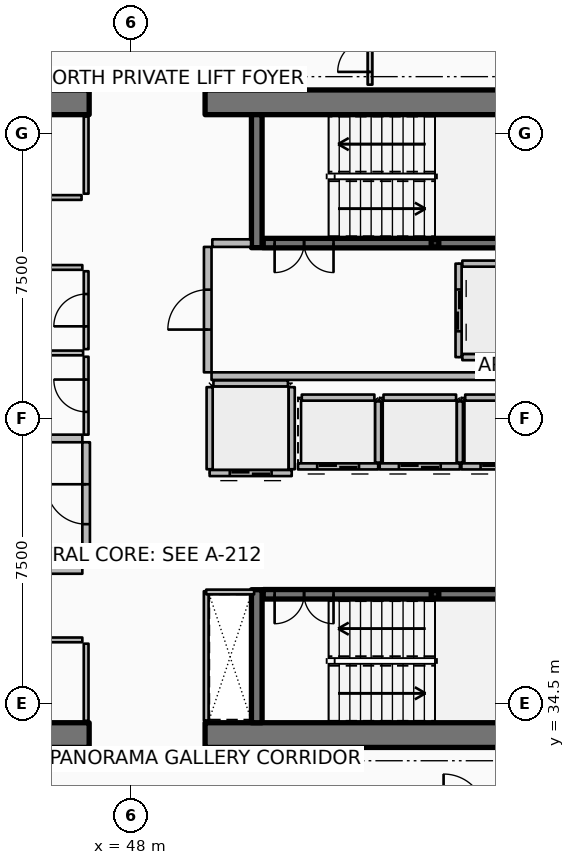
"""IFC4 building model, lengths in metres.
Left out: names, types, materials, properties, quantities, classifications, styles, units other than length and angle.
Written with IfcOpenShell. Run it as: python <this file> out.ifc"""

import sys

from ifc_helpers import new_model, si_unit, direction, frame, frame_2d, origin, origin_2d, place, context, subcontext, project, spatial, rectangle, hollow_rectangle, extrude, element, fill, save


model = new_model("IFC4")
c1 = context("Model", 3, precision=1e-05, world=origin(), true_north=direction((0.0, 1.0)))
c2 = subcontext(c1, "Body", "Model", "MODEL_VIEW")
j1 = project(units=[si_unit("LENGTHUNIT", "METRE"), si_unit("PLANEANGLEUNIT", "RADIAN")], contexts=[c1])
p1 = place(None, origin())
s1 = spatial("IfcSite", under=j1, at=p1, CompositionType="ELEMENT")
p2 = place(p1, origin())
s2 = spatial("IfcBuilding", under=s1, at=p2, CompositionType="ELEMENT")
p3 = place(p2, frame((0.0, 0.0, 259.8)))
s3 = spatial("IfcBuildingStorey", under=s2, at=p3, CompositionType="ELEMENT", Elevation=259.8)
for number, where, z_axis, x_axis in (
    (1, (37.15, 33.675, 0.0), (0.0, 0.0, 1.0), (1.0, 0.0, 0.0)),
    (2, (49.95, 33.675, 0.0), (0.0, 0.0, 1.0), (1.0, 0.0, 0.0)),
    (3, (37.15, 50.325, 0.0), (0.0, 0.0, 1.0), (1.0, 0.0, 0.0)),
    (4, (49.95, 50.325, 0.0), (0.0, 0.0, 1.0), (1.0, 0.0, 0.0)),
):
    element("IfcWall", number, at=place(p3, frame(where, z_axis=z_axis, x_axis=x_axis)), inside=s3, PredefinedType="SHEAR", context=c2, shape_type="SweptSolid", body=[
        extrude(rectangle(XDim=9.75, YDim=0.65, at=frame_2d((4.875, 0.0))), origin(), (0.0, 0.0, 1.0), 3.85),
    ])
for number, where, z_axis, x_axis in (
    (5, (51.31, 46.5, 0.0), (0.0, 0.0, 1.0), (0.0, 1.0, 0.0)),
    (6, (51.31, 34.0, 0.0), (0.0, 0.0, 1.0), (0.0, 1.0, 0.0)),
):
    element("IfcWall", number, at=place(p3, frame(where, z_axis=z_axis, x_axis=x_axis)), inside=s3, PredefinedType="SHEAR", context=c2, shape_type="SweptSolid", body=[
        extrude(rectangle(XDim=3.5, YDim=0.28, at=frame_2d((1.75, 0.0))), origin(), (0.0, 0.0, 1.0), 3.85),
    ])
for number, where, z_axis, x_axis in (
    (7, (56.0, 46.62, 0.0), (0.0, 0.0, 1.0), (1.0, 0.0, 0.0)),
    (8, (56.0, 37.38, 0.0), (0.0, 0.0, 1.0), (1.0, 0.0, 0.0)),
):
    element("IfcColumn", number, at=place(p3, frame(where, z_axis=z_axis, x_axis=x_axis)), inside=s3, PredefinedType="COLUMN", context=c2, shape_type="SweptSolid", body=[
        extrude(hollow_rectangle(XDim=0.2, YDim=0.2, WallThickness=0.01, InnerFilletRadius=0.01, OuterFilletRadius=0.02, at=origin_2d()), origin(), (0.0, 0.0, 1.0), 1.72),
    ])
p4 = place(p3, frame((51.48, 46.62, 0.0), z_axis=(0.0, 0.0, 1.0), x_axis=(1.0, 0.0, 0.0)))
e9 = element("IfcWall", 9, at=p4, inside=s3, PredefinedType="SOLIDWALL", context=c2, shape_type="SweptSolid", body=[
    extrude(rectangle(XDim=7.54, YDim=0.25, at=frame_2d((3.77, 0.0))), origin(), (0.0, 0.0, 1.0), 3.59),
])
p5 = place(p4, frame((0.3, 0.0, 0.0)))
e10 = element("IfcOpeningElement", 10, at=p5, cuts=e9, PredefinedType="OPENING", context=c2, shape_type="SweptSolid", body=[
    extrude(rectangle(XDim=1.55, YDim=2.15, at=frame_2d((0.775, 1.075))), frame((0.0, 0.135, 0.0), z_axis=(0.0, -1.0, 0.0), x_axis=(1.0, 0.0, 0.0)), (0.0, 0.0, 1.0), 0.27),
])
p6 = place(p3, frame((51.48, 37.38, 0.0), z_axis=(0.0, 0.0, 1.0), x_axis=(1.0, 0.0, 0.0)))
e11 = element("IfcWall", 11, at=p6, inside=s3, PredefinedType="SOLIDWALL", context=c2, shape_type="SweptSolid", body=[
    extrude(rectangle(XDim=7.54, YDim=0.25, at=frame_2d((3.77, 0.0))), origin(), (0.0, 0.0, 1.0), 3.59),
])
p7 = place(p6, frame((0.3, 0.0, 0.0)))
e12 = element("IfcOpeningElement", 12, at=p7, cuts=e11, PredefinedType="OPENING", context=c2, shape_type="SweptSolid", body=[
    extrude(rectangle(XDim=1.55, YDim=2.15, at=frame_2d((0.775, 1.075))), frame((0.0, 0.135, 0.0), z_axis=(0.0, -1.0, 0.0), x_axis=(1.0, 0.0, 0.0)), (0.0, 0.0, 1.0), 0.27),
])
p8 = place(p3, frame((54.505, 40.745, 0.0), z_axis=(0.0, 0.0, 1.0), x_axis=(-1.0, 0.0, 0.0)))
e13 = element("IfcWall", 13, at=p8, inside=s3, PredefinedType="PARTITIONING", context=c2, shape_type="SweptSolid", body=[
    extrude(rectangle(XDim=2.11, YDim=0.16, at=frame_2d((1.055, 0.0))), origin(), (0.0, 0.0, 1.0), 3.59),
])
p9 = place(p8, frame((0.505, 0.0, 0.0)))
e14 = element("IfcOpeningElement", 14, at=p9, cuts=e13, PredefinedType="OPENING", context=c2, shape_type="SweptSolid", body=[
    extrude(rectangle(XDim=1.1, YDim=2.1, at=frame_2d((0.55, 1.05))), frame((0.0, 0.09, 0.0), z_axis=(0.0, -1.0, 0.0), x_axis=(1.0, 0.0, 0.0)), (0.0, 0.0, 1.0), 0.18),
])
p10 = place(p3, frame((54.505, 40.845, 0.0), z_axis=(0.0, 0.0, 1.0), x_axis=(0.0, 1.0, 0.0)))
e15 = element("IfcWall", 15, at=p10, inside=s3, PredefinedType="PARTITIONING", context=c2, shape_type="SweptSolid", body=[
    extrude(rectangle(XDim=1.61, YDim=0.16, at=frame_2d((0.805, 0.0))), origin(), (0.0, 0.0, 1.0), 3.59),
])
p11 = place(p3, frame((52.495, 42.555, 0.0), z_axis=(0.0, 0.0, 1.0), x_axis=(1.0, 0.0, 0.0)))
e16 = element("IfcWall", 16, at=p11, inside=s3, PredefinedType="PARTITIONING", context=c2, shape_type="SweptSolid", body=[
    extrude(rectangle(XDim=1.91, YDim=0.16, at=frame_2d((0.955, 0.0))), origin(), (0.0, 0.0, 1.0), 3.59),
])
p12 = place(p3, frame((56.655, 40.745, 0.0), z_axis=(0.0, 0.0, 1.0), x_axis=(-1.0, 0.0, 0.0)))
e17 = element("IfcWall", 17, at=p12, inside=s3, PredefinedType="PARTITIONING", context=c2, shape_type="SweptSolid", body=[
    extrude(rectangle(XDim=2.11, YDim=0.16, at=frame_2d((1.055, 0.0))), origin(), (0.0, 0.0, 1.0), 3.59),
])
p13 = place(p12, frame((0.505, 0.0, 0.0)))
e18 = element("IfcOpeningElement", 18, at=p13, cuts=e17, PredefinedType="OPENING", context=c2, shape_type="SweptSolid", body=[
    extrude(rectangle(XDim=1.1, YDim=2.1, at=frame_2d((0.55, 1.05))), frame((0.0, 0.09, 0.0), z_axis=(0.0, -1.0, 0.0), x_axis=(1.0, 0.0, 0.0)), (0.0, 0.0, 1.0), 0.18),
])
p14 = place(p3, frame((56.655, 40.845, 0.0), z_axis=(0.0, 0.0, 1.0), x_axis=(0.0, 1.0, 0.0)))
e19 = element("IfcWall", 19, at=p14, inside=s3, PredefinedType="PARTITIONING", context=c2, shape_type="SweptSolid", body=[
    extrude(rectangle(XDim=1.61, YDim=0.16, at=frame_2d((0.805, 0.0))), origin(), (0.0, 0.0, 1.0), 3.59),
])
p15 = place(p3, frame((54.645, 42.555, 0.0), z_axis=(0.0, 0.0, 1.0), x_axis=(1.0, 0.0, 0.0)))
e20 = element("IfcWall", 20, at=p15, inside=s3, PredefinedType="PARTITIONING", context=c2, shape_type="SweptSolid", body=[
    extrude(rectangle(XDim=1.91, YDim=0.16, at=frame_2d((0.955, 0.0))), origin(), (0.0, 0.0, 1.0), 3.59),
])
p16 = place(p3, frame((58.805, 40.745, 0.0), z_axis=(0.0, 0.0, 1.0), x_axis=(-1.0, 0.0, 0.0)))
e21 = element("IfcWall", 21, at=p16, inside=s3, PredefinedType="PARTITIONING", context=c2, shape_type="SweptSolid", body=[
    extrude(rectangle(XDim=2.11, YDim=0.16, at=frame_2d((1.055, 0.0))), origin(), (0.0, 0.0, 1.0), 3.59),
])
p17 = place(p16, frame((0.505, 0.0, 0.0)))
e22 = element("IfcOpeningElement", 22, at=p17, cuts=e21, PredefinedType="OPENING", context=c2, shape_type="SweptSolid", body=[
    extrude(rectangle(XDim=1.1, YDim=2.1, at=frame_2d((0.55, 1.05))), frame((0.0, 0.09, 0.0), z_axis=(0.0, -1.0, 0.0), x_axis=(1.0, 0.0, 0.0)), (0.0, 0.0, 1.0), 0.18),
])
p18 = place(p3, frame((56.795, 42.555, 0.0), z_axis=(0.0, 0.0, 1.0), x_axis=(1.0, 0.0, 0.0)))
e23 = element("IfcWall", 23, at=p18, inside=s3, PredefinedType="PARTITIONING", context=c2, shape_type="SweptSolid", body=[
    extrude(rectangle(XDim=1.91, YDim=0.16, at=frame_2d((0.955, 0.0))), origin(), (0.0, 0.0, 1.0), 3.59),
])
p19 = place(p3, frame((56.62, 46.08, 0.0), z_axis=(0.0, 0.0, 1.0), x_axis=(0.0, -1.0, 0.0)))
e24 = element("IfcWall", 24, at=p19, inside=s3, PredefinedType="PARTITIONING", context=c2, shape_type="SweptSolid", body=[
    extrude(rectangle(XDim=2.46, YDim=0.16, at=frame_2d((1.23, 0.0))), origin(), (0.0, 0.0, 1.0), 3.59),
])
p20 = place(p19, frame((0.68, 0.0, 0.0)))
e25 = element("IfcOpeningElement", 25, at=p20, cuts=e24, PredefinedType="OPENING", context=c2, shape_type="SweptSolid", body=[
    extrude(rectangle(XDim=1.1, YDim=2.1, at=frame_2d((0.55, 1.05))), frame((0.0, 0.09, 0.0), z_axis=(0.0, -1.0, 0.0), x_axis=(1.0, 0.0, 0.0)), (0.0, 0.0, 1.0), 0.18),
])
for number, where, z_axis, x_axis in (
    (26, (56.72, 46.08, 0.0), (0.0, 0.0, 1.0), (1.0, 0.0, 0.0)),
    (27, (56.72, 43.62, 0.0), (0.0, 0.0, 1.0), (1.0, 0.0, 0.0)),
):
    element("IfcWall", number, at=place(p3, frame(where, z_axis=z_axis, x_axis=x_axis)), inside=s3, PredefinedType="PARTITIONING", context=c2, shape_type="SweptSolid", body=[
        extrude(rectangle(XDim=2.06, YDim=0.16, at=frame_2d((1.03, 0.0))), origin(), (0.0, 0.0, 1.0), 3.59),
    ])
p21 = place(p3, frame((52.23, 40.57, 0.0), z_axis=(0.0, 0.0, 1.0), x_axis=(-1.0, 0.0, 0.0)))
e28 = element("IfcWall", 28, at=p21, inside=s3, PredefinedType="PARTITIONING", context=c2, shape_type="SweptSolid", body=[
    extrude(rectangle(XDim=2.16, YDim=0.16, at=frame_2d((1.08, 0.0))), origin(), (0.0, 0.0, 1.0), 3.59),
])
p22 = place(p21, frame((0.53, 0.0, 0.0)))
e29 = element("IfcOpeningElement", 29, at=p22, cuts=e28, PredefinedType="OPENING", context=c2, shape_type="SweptSolid", body=[
    extrude(rectangle(XDim=1.1, YDim=2.1, at=frame_2d((0.55, 1.05))), frame((0.0, 0.09, 0.0), z_axis=(0.0, -1.0, 0.0), x_axis=(1.0, 0.0, 0.0)), (0.0, 0.0, 1.0), 0.18),
])
for number, where, z_axis, x_axis in (
    (30, (52.23, 40.67, 0.0), (0.0, 0.0, 1.0), (0.0, 1.0, 0.0)),
    (31, (50.07, 40.67, 0.0), (0.0, 0.0, 1.0), (0.0, 1.0, 0.0)),
):
    element("IfcWall", number, at=place(p3, frame(where, z_axis=z_axis, x_axis=x_axis)), inside=s3, PredefinedType="PARTITIONING", context=c2, shape_type="SweptSolid", body=[
        extrude(rectangle(XDim=2.16, YDim=0.16, at=frame_2d((1.08, 0.0))), origin(), (0.0, 0.0, 1.0), 3.59),
    ])
p23 = place(p3, frame((50.17, 42.93, 0.0), z_axis=(0.0, 0.0, 1.0), x_axis=(1.0, 0.0, 0.0)))
e32 = element("IfcWall", 32, at=p23, inside=s3, PredefinedType="PARTITIONING", context=c2, shape_type="SweptSolid", body=[
    extrude(rectangle(XDim=1.96, YDim=0.16, at=frame_2d((0.98, 0.0))), origin(), (0.0, 0.0, 1.0), 3.59),
])
p24 = place(p3, frame((46.82, 34.05, 0.0), z_axis=(0.0, 0.0, 1.0), x_axis=(0.0, 1.0, 0.0)))
e33 = element("IfcWall", 33, at=p24, inside=s3, PredefinedType="PARTITIONING", context=c2, shape_type="SweptSolid", body=[
    extrude(rectangle(XDim=2.03, YDim=0.125, at=frame_2d((1.015, 0.0))), origin(), (0.0, 0.0, 1.0), 3.03),
])
p25 = place(p3, frame((42.6, 36.18, 0.0), z_axis=(0.0, 0.0, 1.0), x_axis=(1.0, 0.0, 0.0)))
e34 = element("IfcWall", 34, at=p25, inside=s3, PredefinedType="PARTITIONING", context=c2, shape_type="SweptSolid", body=[
    extrude(rectangle(XDim=4.12, YDim=0.125, at=frame_2d((2.06, 0.0))), origin(), (0.0, 0.0, 1.0), 3.03),
])
p26 = place(p25, frame((1.635, 0.0, 0.0)))
e35 = element("IfcOpeningElement", 35, at=p26, cuts=e34, PredefinedType="OPENING", context=c2, shape_type="SweptSolid", body=[
    extrude(rectangle(XDim=0.85, YDim=2.06, at=frame_2d((0.425, 1.03))), frame((0.0, 0.073, 0.0), z_axis=(0.0, -1.0, 0.0), x_axis=(1.0, 0.0, 0.0)), (0.0, 0.0, 1.0), 0.145),
])
p27 = place(p3, frame((46.82, 47.92, 0.0), z_axis=(0.0, 0.0, 1.0), x_axis=(0.0, 1.0, 0.0)))
e36 = element("IfcWall", 36, at=p27, inside=s3, PredefinedType="PARTITIONING", context=c2, shape_type="SweptSolid", body=[
    extrude(rectangle(XDim=2.03, YDim=0.125, at=frame_2d((1.015, 0.0))), origin(), (0.0, 0.0, 1.0), 3.03),
])
p28 = place(p3, frame((37.92, 47.82, 0.0), z_axis=(0.0, 0.0, 1.0), x_axis=(1.0, 0.0, 0.0)))
e37 = element("IfcWall", 37, at=p28, inside=s3, PredefinedType="PARTITIONING", context=c2, shape_type="SweptSolid", body=[
    extrude(rectangle(XDim=8.78, YDim=0.125, at=frame_2d((4.39, 0.0))), origin(), (0.0, 0.0, 1.0), 3.03),
])
p29 = place(p28, frame((3.965, 0.0, 0.0)))
e38 = element("IfcOpeningElement", 38, at=p29, cuts=e37, PredefinedType="OPENING", context=c2, shape_type="SweptSolid", body=[
    extrude(rectangle(XDim=0.85, YDim=2.06, at=frame_2d((0.425, 1.03))), frame((0.0, 0.073, 0.0), z_axis=(0.0, -1.0, 0.0), x_axis=(1.0, 0.0, 0.0)), (0.0, 0.0, 1.0), 0.145),
])
p30 = place(p3, frame((41.35, 38.02, 0.0), z_axis=(0.0, 0.0, 1.0), x_axis=(1.0, 0.0, 0.0)))
e39 = element("IfcWall", 39, at=p30, inside=s3, PredefinedType="PARTITIONING", context=c2, shape_type="SweptSolid", body=[
    extrude(rectangle(XDim=5.37, YDim=0.2, at=frame_2d((2.685, 0.0))), origin(), (0.0, 0.0, 1.0), 3.59),
])
p31 = place(p3, frame((43.92, 41.48, 0.0), z_axis=(0.0, 0.0, 1.0), x_axis=(1.0, 0.0, 0.0)))
e40 = element("IfcWall", 40, at=p31, inside=s3, PredefinedType="PARTITIONING", context=c2, shape_type="SweptSolid", body=[
    extrude(rectangle(XDim=2.8, YDim=0.2, at=frame_2d((1.4, 0.0))), origin(), (0.0, 0.0, 1.0), 3.59),
])
p32 = place(p3, frame((46.82, 38.12, 0.0), z_axis=(0.0, 0.0, 1.0), x_axis=(0.0, 1.0, 0.0)))
e41 = element("IfcWall", 41, at=p32, inside=s3, PredefinedType="PARTITIONING", context=c2, shape_type="SweptSolid", body=[
    extrude(rectangle(XDim=3.26, YDim=0.2, at=frame_2d((1.63, 0.0))), origin(), (0.0, 0.0, 1.0), 3.59),
])
p33 = place(p32, frame((1.105, 0.0, 0.0)))
e42 = element("IfcOpeningElement", 42, at=p33, cuts=e41, PredefinedType="OPENING", context=c2, shape_type="SweptSolid", body=[
    extrude(rectangle(XDim=1.05, YDim=2.1, at=frame_2d((0.525, 1.05))), frame((0.0, 0.11, 0.0), z_axis=(0.0, -1.0, 0.0), x_axis=(1.0, 0.0, 0.0)), (0.0, 0.0, 1.0), 0.22),
])
p34 = place(p3, frame((50.12, 43.12, 0.0), z_axis=(0.0, 0.0, 1.0), x_axis=(1.0, 0.0, 0.0)))
e43 = element("IfcWall", 43, at=p34, inside=s3, PredefinedType="PARTITIONING", context=c2, shape_type="SweptSolid", body=[
    extrude(rectangle(XDim=8.88, YDim=0.2, at=frame_2d((4.44, 0.0))), origin(), (0.0, 0.0, 1.0), 3.59),
])
p35 = place(p3, frame((50.14, 46.62, 0.0), z_axis=(0.0, 0.0, 1.0), x_axis=(1.0, 0.0, 0.0)))
e44 = element("IfcWall", 44, at=p35, inside=s3, PredefinedType="PARTITIONING", context=c2, shape_type="SweptSolid", body=[
    extrude(rectangle(XDim=1.02, YDim=0.2, at=frame_2d((0.51, 0.0))), origin(), (0.0, 0.0, 1.0), 3.59),
])
p36 = place(p3, frame((50.02, 43.22, 0.0), z_axis=(0.0, 0.0, 1.0), x_axis=(0.0, 1.0, 0.0)))
e45 = element("IfcWall", 45, at=p36, inside=s3, PredefinedType="PARTITIONING", context=c2, shape_type="SweptSolid", body=[
    extrude(rectangle(XDim=3.3, YDim=0.2, at=frame_2d((1.65, 0.0))), origin(), (0.0, 0.0, 1.0), 3.59),
])
p37 = place(p36, frame((1.125, 0.0, 0.0)))
e46 = element("IfcOpeningElement", 46, at=p37, cuts=e45, PredefinedType="OPENING", context=c2, shape_type="SweptSolid", body=[
    extrude(rectangle(XDim=1.05, YDim=2.1, at=frame_2d((0.525, 1.05))), frame((0.0, 0.11, 0.0), z_axis=(0.0, -1.0, 0.0), x_axis=(1.0, 0.0, 0.0)), (0.0, 0.0, 1.0), 0.22),
])
p38 = place(p3, frame((41.36, 45.98, 0.0), z_axis=(0.0, 0.0, 1.0), x_axis=(1.0, 0.0, 0.0)))
e47 = element("IfcWall", 47, at=p38, inside=s3, PredefinedType="PARTITIONING", context=c2, shape_type="SweptSolid", body=[
    extrude(rectangle(XDim=5.36, YDim=0.125, at=frame_2d((2.68, 0.0))), origin(), (0.0, 0.0, 1.0), 3.03),
])
p39 = place(p3, frame((49.98, 34.06, 0.0), z_axis=(0.0, 0.0, 1.0), x_axis=(0.0, 1.0, 0.0)))
e48 = element("IfcWall", 48, at=p39, inside=s3, PredefinedType="PARTITIONING", context=c2, shape_type="SweptSolid", body=[
    extrude(rectangle(XDim=3.4, YDim=0.125, at=frame_2d((1.7, 0.0))), origin(), (0.0, 0.0, 1.0), 3.03),
])
p40 = place(p3, frame((49.98, 37.44, 0.0), z_axis=(0.0, 0.0, 1.0), x_axis=(1.0, 0.0, 0.0)))
e49 = element("IfcWall", 49, at=p40, inside=s3, PredefinedType="PARTITIONING", context=c2, shape_type="SweptSolid", body=[
    extrude(rectangle(XDim=1.26, YDim=0.125, at=frame_2d((0.63, 0.0))), origin(), (0.0, 0.0, 1.0), 3.03),
])
p41 = place(p3, frame((44.03, 43.73, 0.0), z_axis=(0.0, 0.0, 1.0), x_axis=(1.0, 0.0, 0.0)))
e50 = element("IfcWall", 50, at=p41, inside=s3, PredefinedType="PARTITIONING", context=c2, shape_type="SweptSolid", body=[
    extrude(rectangle(XDim=2.71, YDim=0.125, at=frame_2d((1.355, 0.0))), origin(), (0.0, 0.0, 1.0), 3.03),
])
p42 = place(p3, frame((46.82, 41.58, 0.0), z_axis=(0.0, 0.0, 1.0), x_axis=(0.0, 1.0, 0.0)))
e51 = element("IfcWall", 51, at=p42, inside=s3, PredefinedType="PARTITIONING", context=c2, shape_type="SweptSolid", body=[
    extrude(rectangle(XDim=2.05, YDim=0.125, at=frame_2d((1.025, 0.0))), origin(), (0.0, 0.0, 1.0), 3.03),
])
p43 = place(p42, frame((0.6, 0.0, 0.0)))
e52 = element("IfcOpeningElement", 52, at=p43, cuts=e51, PredefinedType="OPENING", context=c2, shape_type="SweptSolid", body=[
    extrude(rectangle(XDim=0.85, YDim=2.06, at=frame_2d((0.425, 1.03))), frame((0.0, 0.073, 0.0), z_axis=(0.0, -1.0, 0.0), x_axis=(1.0, 0.0, 0.0)), (0.0, 0.0, 1.0), 0.145),
])
p44 = place(p3, frame((46.82, 43.83, 0.0), z_axis=(0.0, 0.0, 1.0), x_axis=(0.0, 1.0, 0.0)))
e53 = element("IfcWall", 53, at=p44, inside=s3, PredefinedType="PARTITIONING", context=c2, shape_type="SweptSolid", body=[
    extrude(rectangle(XDim=2.05, YDim=0.125, at=frame_2d((1.025, 0.0))), origin(), (0.0, 0.0, 1.0), 3.03),
])
p45 = place(p44, frame((0.6, 0.0, 0.0)))
e54 = element("IfcOpeningElement", 54, at=p45, cuts=e53, PredefinedType="OPENING", context=c2, shape_type="SweptSolid", body=[
    extrude(rectangle(XDim=0.85, YDim=2.06, at=frame_2d((0.425, 1.03))), frame((0.0, 0.073, 0.0), z_axis=(0.0, -1.0, 0.0), x_axis=(1.0, 0.0, 0.0)), (0.0, 0.0, 1.0), 0.145),
])
p46 = place(p3, frame((54.29, 50.79, 0.0), z_axis=(0.0, 0.0, 1.0), x_axis=(0.0, 1.0, 0.0)))
e55 = element("IfcWall", 55, at=p46, inside=s3, PredefinedType="PARTITIONING", context=c2, shape_type="SweptSolid", body=[
    extrude(rectangle(XDim=1.52, YDim=0.125, at=frame_2d((0.76, 0.0))), origin(), (0.0, 0.0, 1.0), 3.03),
])
p47 = place(p46, frame((0.335, 0.0, 0.0)))
e56 = element("IfcOpeningElement", 56, at=p47, cuts=e55, PredefinedType="OPENING", context=c2, shape_type="SweptSolid", body=[
    extrude(rectangle(XDim=0.85, YDim=2.06, at=frame_2d((0.425, 1.03))), frame((0.0, 0.073, 0.0), z_axis=(0.0, -1.0, 0.0), x_axis=(1.0, 0.0, 0.0)), (0.0, 0.0, 1.0), 0.145),
])
p48 = place(p5, origin())
e57 = element("IfcDoor", 57, at=p48, inside=s3, OperationType="DOUBLE_DOOR_SINGLE_SWING", PredefinedType="DOOR", context=c2, shape_type="SweptSolid", body=[
    extrude(rectangle(XDim=1.55, YDim=2.15, at=frame_2d((0.775, 1.075))), frame((0.0, 0.025, 0.0), z_axis=(0.0, -1.0, 0.0), x_axis=(1.0, 0.0, 0.0)), (0.0, 0.0, 1.0), 0.05),
])
fill(e10, e57)
p49 = place(p7, origin())
e58 = element("IfcDoor", 58, at=p49, inside=s3, OperationType="DOUBLE_DOOR_SINGLE_SWING", PredefinedType="DOOR", context=c2, shape_type="SweptSolid", body=[
    extrude(rectangle(XDim=1.55, YDim=2.15, at=frame_2d((0.775, 1.075))), frame((0.0, 0.025, 0.0), z_axis=(0.0, -1.0, 0.0), x_axis=(1.0, 0.0, 0.0)), (0.0, 0.0, 1.0), 0.05),
])
fill(e12, e58)
p50 = place(p9, origin())
e59 = element("IfcDoor", 59, at=p50, inside=s3, OperationType="DOUBLE_DOOR_SLIDING", PredefinedType="DOOR", context=c2, shape_type="SweptSolid", body=[
    extrude(rectangle(XDim=1.1, YDim=2.1, at=frame_2d((0.55, 1.05))), frame((0.0, 0.025, 0.0), z_axis=(0.0, -1.0, 0.0), x_axis=(1.0, 0.0, 0.0)), (0.0, 0.0, 1.0), 0.05),
])
fill(e14, e59)
p51 = place(p13, origin())
e60 = element("IfcDoor", 60, at=p51, inside=s3, OperationType="DOUBLE_DOOR_SLIDING", PredefinedType="DOOR", context=c2, shape_type="SweptSolid", body=[
    extrude(rectangle(XDim=1.1, YDim=2.1, at=frame_2d((0.55, 1.05))), frame((0.0, 0.025, 0.0), z_axis=(0.0, -1.0, 0.0), x_axis=(1.0, 0.0, 0.0)), (0.0, 0.0, 1.0), 0.05),
])
fill(e18, e60)
p52 = place(p17, origin())
e61 = element("IfcDoor", 61, at=p52, inside=s3, OperationType="DOUBLE_DOOR_SLIDING", PredefinedType="DOOR", context=c2, shape_type="SweptSolid", body=[
    extrude(rectangle(XDim=1.1, YDim=2.1, at=frame_2d((0.55, 1.05))), frame((0.0, 0.025, 0.0), z_axis=(0.0, -1.0, 0.0), x_axis=(1.0, 0.0, 0.0)), (0.0, 0.0, 1.0), 0.05),
])
fill(e22, e61)
p53 = place(p20, origin())
e62 = element("IfcDoor", 62, at=p53, inside=s3, OperationType="DOUBLE_DOOR_SLIDING", PredefinedType="DOOR", context=c2, shape_type="SweptSolid", body=[
    extrude(rectangle(XDim=1.1, YDim=2.1, at=frame_2d((0.55, 1.05))), frame((0.0, 0.025, 0.0), z_axis=(0.0, -1.0, 0.0), x_axis=(1.0, 0.0, 0.0)), (0.0, 0.0, 1.0), 0.05),
])
fill(e25, e62)
p54 = place(p22, origin())
e63 = element("IfcDoor", 63, at=p54, inside=s3, OperationType="DOUBLE_DOOR_SLIDING", PredefinedType="DOOR", context=c2, shape_type="SweptSolid", body=[
    extrude(rectangle(XDim=1.1, YDim=2.1, at=frame_2d((0.55, 1.05))), frame((0.0, 0.025, 0.0), z_axis=(0.0, -1.0, 0.0), x_axis=(1.0, 0.0, 0.0)), (0.0, 0.0, 1.0), 0.05),
])
fill(e29, e63)
p55 = place(p33, origin())
e64 = element("IfcDoor", 64, at=p55, inside=s3, OperationType="SINGLE_SWING_RIGHT", PredefinedType="DOOR", context=c2, shape_type="SweptSolid", body=[
    extrude(rectangle(XDim=1.05, YDim=2.1, at=frame_2d((0.525, 1.05))), frame((0.0, 0.025, 0.0), z_axis=(0.0, -1.0, 0.0), x_axis=(1.0, 0.0, 0.0)), (0.0, 0.0, 1.0), 0.05),
])
fill(e42, e64)
p56 = place(p37, origin())
e65 = element("IfcDoor", 65, at=p56, inside=s3, OperationType="SINGLE_SWING_LEFT", PredefinedType="DOOR", context=c2, shape_type="SweptSolid", body=[
    extrude(rectangle(XDim=1.05, YDim=2.1, at=frame_2d((0.525, 1.05))), frame((0.0, 0.025, 0.0), z_axis=(0.0, -1.0, 0.0), x_axis=(1.0, 0.0, 0.0)), (0.0, 0.0, 1.0), 0.05),
])
fill(e46, e65)
p57 = place(p43, origin())
e66 = element("IfcDoor", 66, at=p57, inside=s3, OperationType="SINGLE_SWING_RIGHT", PredefinedType="DOOR", context=c2, shape_type="SweptSolid", body=[
    extrude(rectangle(XDim=0.85, YDim=2.06, at=frame_2d((0.425, 1.03))), frame((0.0, 0.025, 0.0), z_axis=(0.0, -1.0, 0.0), x_axis=(1.0, 0.0, 0.0)), (0.0, 0.0, 1.0), 0.05),
])
fill(e52, e66)
p58 = place(p45, origin())
e67 = element("IfcDoor", 67, at=p58, inside=s3, OperationType="SINGLE_SWING_LEFT", PredefinedType="DOOR", context=c2, shape_type="SweptSolid", body=[
    extrude(rectangle(XDim=0.85, YDim=2.06, at=frame_2d((0.425, 1.03))), frame((0.0, 0.025, 0.0), z_axis=(0.0, -1.0, 0.0), x_axis=(1.0, 0.0, 0.0)), (0.0, 0.0, 1.0), 0.05),
])
fill(e54, e67)
p59 = place(p47, origin())
e68 = element("IfcDoor", 68, at=p59, inside=s3, OperationType="SINGLE_SWING_LEFT", PredefinedType="DOOR", context=c2, shape_type="SweptSolid", body=[
    extrude(rectangle(XDim=0.85, YDim=2.06, at=frame_2d((0.425, 1.03))), frame((0.0, 0.025, 0.0), z_axis=(0.0, -1.0, 0.0), x_axis=(1.0, 0.0, 0.0)), (0.0, 0.0, 1.0), 0.05),
])
fill(e56, e68)
save(model, sys.argv[1])
